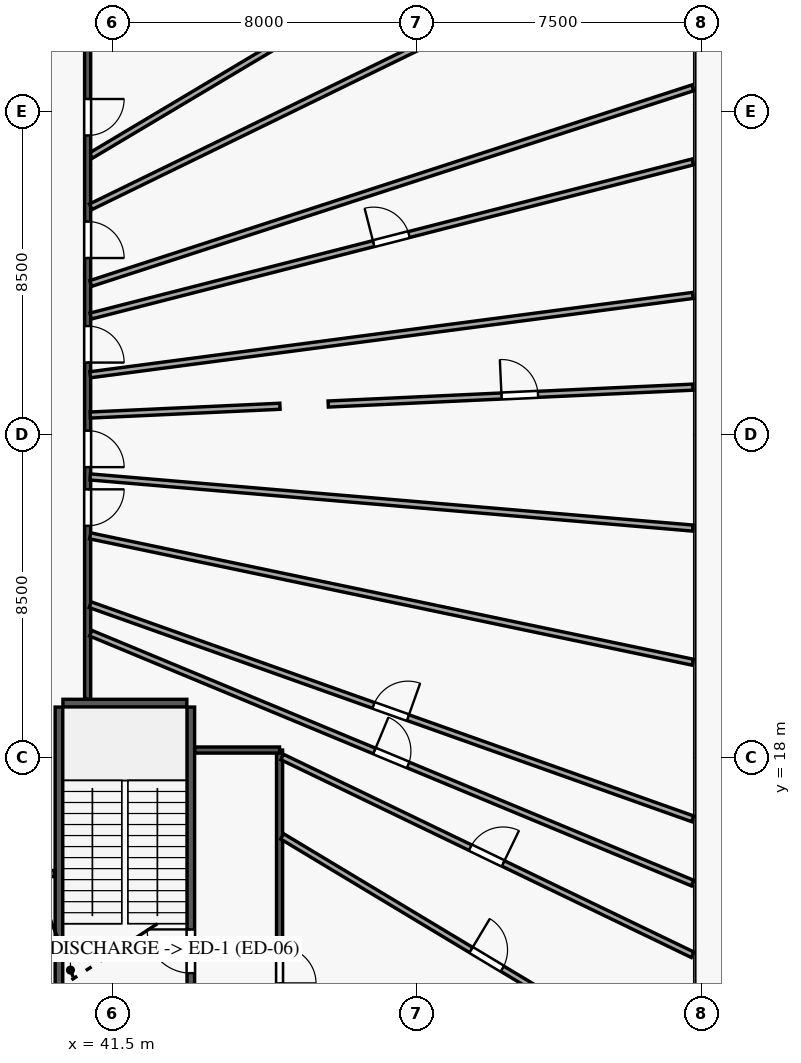
"""IFC4 building model, lengths in metres.
Left out: names, types, materials, properties, quantities, classifications, styles, units other than length and angle.
Written with IfcOpenShell. Run it as: python <this file> out.ifc"""

import sys

from ifc_helpers import new_model, si_unit, direction, frame, frame_2d, origin, origin_with_axes, origin_2d, place, context, subcontext, project, spatial, rectangle, circle, extrude, source, transform, mapped, element, fill, save


model = new_model("IFC4")
c1 = context("Model", 3, precision=1e-05, world=origin(), true_north=direction((0.0, 1.0)))
c2 = subcontext(c1, "Body", "Model", "MODEL_VIEW")
j1 = project(units=[si_unit("LENGTHUNIT", "METRE"), si_unit("PLANEANGLEUNIT", "RADIAN")], contexts=[c1])
p1 = place(None, origin())
s1 = spatial("IfcSite", under=j1, at=p1, CompositionType="ELEMENT")
p2 = place(p1, origin())
s2 = spatial("IfcBuilding", under=s1, at=p2, CompositionType="ELEMENT")
p3 = place(p2, origin())
s3 = spatial("IfcBuildingStorey", under=s2, at=p3, CompositionType="ELEMENT", Elevation=0.0)
m1 = source(origin_with_axes(), c2, "Body", "SweptSolid", [
    extrude(circle(Radius=0.9, at=origin_2d()), origin(), (0.0, 0.0, 1.0), 4.5),
])
p4 = place(p3, frame((46.8, 26.5, 0.0), z_axis=(0.0, 0.0, 1.0), x_axis=(1.0, 0.0, 0.0)))
e1 = element("IfcColumn", 1, at=p4, inside=s3, PredefinedType="COLUMN", context=c2, shape_type="MappedRepresentation", body=[
    mapped(m1, transform((0.0, 0.0, 0.0), scale=1.0)),
])
m2 = source(origin_with_axes(), c2, "Body", "SweptSolid", [
    extrude(rectangle(XDim=0.6, YDim=0.9, at=origin_2d()), origin(), (0.0, 0.0, 1.0), 4.5),
])
for number, where, z_axis, x_axis in (
    (2, (54.8, 18.5, 0.0), (0.0, 0.0, 1.0), (1.0, 0.0, 0.0)),
    (3, (54.8, 34.5, 0.0), (0.0, 0.0, 1.0), (1.0, 0.0, 0.0)),
):
    element("IfcColumn", number, at=place(p3, frame(where, z_axis=z_axis, x_axis=x_axis)), inside=s3, PredefinedType="PILASTER", context=c2, shape_type="MappedRepresentation", body=[
        mapped(m2, transform((0.0, 0.0, 0.0), scale=1.0)),
    ])
p5 = place(p3, frame((40.095, 11.98, 0.0), z_axis=(0.0, 0.0, 1.0), x_axis=(0.0, 1.0, 0.0)))
e4 = element("IfcWall", 4, at=p5, inside=s3, PredefinedType="SHEAR", context=c2, shape_type="SweptSolid", body=[
    extrude(rectangle(XDim=7.35, YDim=0.2, at=frame_2d((3.675, 0.0))), origin(), (0.0, 0.0, 1.0), 4.2),
])
p6 = place(p3, frame((43.565, 11.98, 0.0), z_axis=(0.0, 0.0, 1.0), x_axis=(0.0, 1.0, 0.0)))
e5 = element("IfcWall", 5, at=p6, inside=s3, PredefinedType="SHEAR", context=c2, shape_type="SweptSolid", body=[
    extrude(rectangle(XDim=7.35, YDim=0.2, at=frame_2d((3.675, 0.0))), origin(), (0.0, 0.0, 1.0), 4.2),
])
p7 = place(p6, frame((0.35, 0.0, 0.0)))
e6 = element("IfcOpeningElement", 6, at=p7, cuts=e5, PredefinedType="OPENING", context=c2, shape_type="SweptSolid", body=[
    extrude(rectangle(XDim=1.15, YDim=2.15, at=frame_2d((0.575, 1.075))), frame((0.0, 0.11, 0.0), z_axis=(0.0, -1.0, 0.0), x_axis=(1.0, 0.0, 0.0)), (0.0, 0.0, 1.0), 0.22),
])
p8 = place(p3, frame((40.2, 19.435, 0.0), z_axis=(0.0, 0.0, 1.0), x_axis=(1.0, 0.0, 0.0)))
e7 = element("IfcWall", 7, at=p8, inside=s3, PredefinedType="SHEAR", context=c2, shape_type="SweptSolid", body=[
    extrude(rectangle(XDim=3.26, YDim=0.2, at=frame_2d((1.63, 0.0))), origin(), (0.0, 0.0, 1.0), 4.2),
])
p9 = place(p3, frame((40.932, 33.839, 0.0), z_axis=(0.0, 0.0, 1.0), x_axis=(0.859023594577, 0.51193599596, 0.0)))
e8 = element("IfcWall", 8, at=p9, inside=s3, PredefinedType="PARTITIONING", context=c2, shape_type="SweptSolid", body=[
    extrude(rectangle(XDim=18.433, YDim=0.16, at=frame_2d((9.216, 0.0))), origin(), (0.0, 0.0, 1.0), 4.2),
])
p10 = place(p9, frame((8.724, 0.0, 0.0)))
e9 = element("IfcOpeningElement", 9, at=p10, cuts=e8, PredefinedType="OPENING", context=c2, shape_type="SweptSolid", body=[
    extrude(rectangle(XDim=0.96, YDim=2.15, at=frame_2d((0.48, 1.075))), frame((0.0, 0.09, 0.0), z_axis=(0.0, -1.0, 0.0), x_axis=(1.0, 0.0, 0.0)), (0.0, 0.0, 1.0), 0.18),
])
p11 = place(p3, frame((40.85, 38.05, 0.0), z_axis=(0.0, 0.0, 1.0), x_axis=(0.0, -1.0, 0.0)))
e10 = element("IfcWall", 10, at=p11, inside=s3, PredefinedType="PARTITIONING", context=c2, shape_type="SweptSolid", body=[
    extrude(rectangle(XDim=18.508, YDim=0.16, at=frame_2d((9.254, 0.0))), origin(), (0.0, 0.0, 1.0), 3.25),
])
p12 = place(p11, frame((12.99, 0.0, 0.0)))
e11 = element("IfcOpeningElement", 11, at=p12, cuts=e10, PredefinedType="OPENING", context=c2, shape_type="SweptSolid", body=[
    extrude(rectangle(XDim=0.96, YDim=2.15, at=frame_2d((0.48, 1.075))), frame((0.0, 0.09, 0.0), z_axis=(0.0, -1.0, 0.0), x_axis=(1.0, 0.0, 0.0)), (0.0, 0.0, 1.0), 0.18),
])
p13 = place(p11, frame((11.446, 0.0, 0.0)))
e12 = element("IfcOpeningElement", 12, at=p13, cuts=e10, PredefinedType="OPENING", context=c2, shape_type="SweptSolid", body=[
    extrude(rectangle(XDim=0.96, YDim=2.15, at=frame_2d((0.48, 1.075))), frame((0.0, 0.09, 0.0), z_axis=(0.0, -1.0, 0.0), x_axis=(1.0, 0.0, 0.0)), (0.0, 0.0, 1.0), 0.18),
])
p14 = place(p11, frame((8.695, 0.0, 0.0)))
e13 = element("IfcOpeningElement", 13, at=p14, cuts=e10, PredefinedType="OPENING", context=c2, shape_type="SweptSolid", body=[
    extrude(rectangle(XDim=0.96, YDim=2.15, at=frame_2d((0.48, 1.075))), frame((0.0, 0.09, 0.0), z_axis=(0.0, -1.0, 0.0), x_axis=(1.0, 0.0, 0.0)), (0.0, 0.0, 1.0), 0.18),
])
p15 = place(p11, frame((5.944, 0.0, 0.0)))
e14 = element("IfcOpeningElement", 14, at=p15, cuts=e10, PredefinedType="OPENING", context=c2, shape_type="SweptSolid", body=[
    extrude(rectangle(XDim=0.96, YDim=2.15, at=frame_2d((0.48, 1.075))), frame((0.0, 0.09, 0.0), z_axis=(0.0, -1.0, 0.0), x_axis=(1.0, 0.0, 0.0)), (0.0, 0.0, 1.0), 0.18),
])
p16 = place(p11, frame((2.72, 0.0, 0.0)))
e15 = element("IfcOpeningElement", 15, at=p16, cuts=e10, PredefinedType="OPENING", context=c2, shape_type="SweptSolid", body=[
    extrude(rectangle(XDim=0.96, YDim=2.15, at=frame_2d((0.48, 1.075))), frame((0.0, 0.09, 0.0), z_axis=(0.0, -1.0, 0.0), x_axis=(1.0, 0.0, 0.0)), (0.0, 0.0, 1.0), 0.18),
])
p17 = place(p3, frame((40.932, 32.495, 0.0), z_axis=(0.0, 0.0, 1.0), x_axis=(0.898852728793, 0.438250809403, 0.0)))
e16 = element("IfcWall", 16, at=p17, inside=s3, PredefinedType="PARTITIONING", context=c2, shape_type="SweptSolid", body=[
    extrude(rectangle(XDim=17.619, YDim=0.16, at=frame_2d((8.809, 0.0))), origin(), (0.0, 0.0, 1.0), 4.2),
])
p18 = place(p3, frame((40.932, 21.274, 0.0), z_axis=(0.0, 0.0, 1.0), x_axis=(0.923573591062, -0.383421206889, 0.0)))
e17 = element("IfcWall", 17, at=p18, inside=s3, PredefinedType="PARTITIONING", context=c2, shape_type="SweptSolid", body=[
    extrude(rectangle(XDim=17.149, YDim=0.16, at=frame_2d((8.574, 0.0))), origin(), (0.0, 0.0, 1.0), 4.2),
])
p19 = place(p18, frame((8.082, 0.0, 0.0)))
e18 = element("IfcOpeningElement", 18, at=p19, cuts=e17, PredefinedType="OPENING", context=c2, shape_type="SweptSolid", body=[
    extrude(rectangle(XDim=0.96, YDim=2.15, at=frame_2d((0.48, 1.075))), frame((0.0, 0.09, 0.0), z_axis=(0.0, -1.0, 0.0), x_axis=(1.0, 0.0, 0.0)), (0.0, 0.0, 1.0), 0.18),
])
p20 = place(p3, frame((40.918, 22.024, 0.0), z_axis=(0.0, 0.0, 1.0), x_axis=(0.942274220907, -0.334842190613, 0.0)))
e19 = element("IfcWall", 19, at=p20, inside=s3, PredefinedType="PARTITIONING", context=c2, shape_type="SweptSolid", body=[
    extrude(rectangle(XDim=16.824, YDim=0.16, at=frame_2d((8.412, 0.0))), origin(), (0.0, 0.0, 1.0), 4.2),
])
p21 = place(p20, frame((7.912, 0.0, 0.0)))
e20 = element("IfcOpeningElement", 20, at=p21, cuts=e19, PredefinedType="OPENING", context=c2, shape_type="SweptSolid", body=[
    extrude(rectangle(XDim=0.96, YDim=2.15, at=frame_2d((0.48, 1.075))), frame((0.0, 0.09, 0.0), z_axis=(0.0, -1.0, 0.0), x_axis=(1.0, 0.0, 0.0)), (0.0, 0.0, 1.0), 0.18),
])
p22 = place(p3, frame((40.932, 30.476, 0.0), z_axis=(0.0, 0.0, 1.0), x_axis=(0.951055611127, 0.309019780181, 0.0)))
e21 = element("IfcWall", 21, at=p22, inside=s3, PredefinedType="PARTITIONING", context=c2, shape_type="SweptSolid", body=[
    extrude(rectangle(XDim=16.655, YDim=0.16, at=frame_2d((8.328, 0.0))), origin(), (0.0, 0.0, 1.0), 3.7),
])
p23 = place(p3, frame((40.932, 29.62, 0.0), z_axis=(0.0, 0.0, 1.0), x_axis=(0.968775770521, 0.247938513451, 0.0)))
e22 = element("IfcWall", 22, at=p23, inside=s3, PredefinedType="PARTITIONING", context=c2, shape_type="SweptSolid", body=[
    extrude(rectangle(XDim=16.352, YDim=0.16, at=frame_2d((8.176, 0.0))), origin(), (0.0, 0.0, 1.0), 3.7),
])
p24 = place(p23, frame((7.683, 0.0, 0.0)))
e23 = element("IfcOpeningElement", 23, at=p24, cuts=e22, PredefinedType="OPENING", context=c2, shape_type="SweptSolid", body=[
    extrude(rectangle(XDim=0.96, YDim=2.15, at=frame_2d((0.48, 1.075))), frame((0.0, 0.09, 0.0), z_axis=(0.0, -1.0, 0.0), x_axis=(1.0, 0.0, 0.0)), (0.0, 0.0, 1.0), 0.18),
])
p25 = place(p3, frame((45.9, 18.2, 0.0), z_axis=(0.0, 0.0, 1.0), x_axis=(0.0, -1.0, 0.0)))
e24 = element("IfcWall", 24, at=p25, inside=s3, PredefinedType="PARTITIONING", context=c2, shape_type="SweptSolid", body=[
    extrude(rectangle(XDim=16.235, YDim=0.16, at=frame_2d((8.117, 0.0))), origin(), (0.0, 0.0, 1.0), 4.2),
])
p26 = place(p25, frame((11.935, 0.0, 0.0)))
e25 = element("IfcOpeningElement", 25, at=p26, cuts=e24, PredefinedType="OPENING", context=c2, shape_type="SweptSolid", body=[
    extrude(rectangle(XDim=0.96, YDim=2.15, at=frame_2d((0.48, 1.075))), frame((0.0, 0.09, 0.0), z_axis=(0.0, -1.0, 0.0), x_axis=(1.0, 0.0, 0.0)), (0.0, 0.0, 1.0), 0.18),
])
p27 = place(p25, frame((8.495, 0.0, 0.0)))
e26 = element("IfcOpeningElement", 26, at=p27, cuts=e24, PredefinedType="OPENING", context=c2, shape_type="SweptSolid", body=[
    extrude(rectangle(XDim=0.96, YDim=2.15, at=frame_2d((0.48, 1.075))), frame((0.0, 0.09, 0.0), z_axis=(0.0, -1.0, 0.0), x_axis=(1.0, 0.0, 0.0)), (0.0, 0.0, 1.0), 0.18),
])
p28 = place(p25, frame((5.181, 0.0, 0.0)))
e27 = element("IfcOpeningElement", 27, at=p28, cuts=e24, PredefinedType="OPENING", context=c2, shape_type="SweptSolid", body=[
    extrude(rectangle(XDim=0.96, YDim=2.15, at=frame_2d((0.48, 1.075))), frame((0.0, 0.09, 0.0), z_axis=(0.0, -1.0, 0.0), x_axis=(1.0, 0.0, 0.0)), (0.0, 0.0, 1.0), 0.18),
])
p29 = place(p3, frame((40.917, 23.835, 0.0), z_axis=(0.0, 0.0, 1.0), x_axis=(0.978723393047, -0.205184112209, 0.0)))
e28 = element("IfcWall", 28, at=p29, inside=s3, PredefinedType="PARTITIONING", context=c2, shape_type="SweptSolid", body=[
    extrude(rectangle(XDim=16.201, YDim=0.16, at=frame_2d((8.101, 0.0))), origin(), (0.0, 0.0, 1.0), 3.7),
])
p30 = place(p3, frame((40.917, 28.074, 0.0), z_axis=(0.0, 0.0, 1.0), x_axis=(0.991445045126, 0.130524796478, 0.0)))
e29 = element("IfcWall", 29, at=p30, inside=s3, PredefinedType="PARTITIONING", context=c2, shape_type="SweptSolid", body=[
    extrude(rectangle(XDim=15.994, YDim=0.16, at=frame_2d((7.997, 0.0))), origin(), (0.0, 0.0, 1.0), 3.7),
])
p31 = place(p3, frame((40.917, 25.386, 0.0), z_axis=(0.0, 0.0, 1.0), x_axis=(0.996417423624, -0.084571377535, 0.0)))
e30 = element("IfcWall", 30, at=p31, inside=s3, PredefinedType="PARTITIONING", context=c2, shape_type="SweptSolid", body=[
    extrude(rectangle(XDim=15.915, YDim=0.16, at=frame_2d((7.958, 0.0))), origin(), (0.0, 0.0, 1.0), 3.7),
])
p32 = place(p3, frame((34.032, 14.868, 0.0), z_axis=(0.0, 0.0, 1.0), x_axis=(0.433724291506, -0.901045636445, 0.0)))
e31 = element("IfcWall", 31, at=p32, inside=s3, PredefinedType="PARTITIONING", context=c2, shape_type="SweptSolid", body=[
    extrude(rectangle(XDim=14.468, YDim=0.16, at=frame_2d((7.234, 0.0))), origin(), (0.0, 0.0, 1.0), 4.2),
])
p33 = place(p3, frame((39.988, 14.95, 0.0), z_axis=(0.0, 0.0, 1.0), x_axis=(-1.0, 0.0, 0.0)))
e32 = element("IfcWall", 32, at=p33, inside=s3, PredefinedType="PARTITIONING", context=c2, shape_type="SweptSolid", body=[
    extrude(rectangle(XDim=14.388, YDim=0.16, at=frame_2d((7.194, 0.0))), origin(), (0.0, 0.0, 1.0), 4.2),
])
p34 = place(p33, frame((10.19, 0.0, 0.0)))
e33 = element("IfcOpeningElement", 33, at=p34, cuts=e32, PredefinedType="OPENING", context=c2, shape_type="SweptSolid", body=[
    extrude(rectangle(XDim=0.96, YDim=2.15, at=frame_2d((0.48, 1.075))), frame((0.0, 0.09, 0.0), z_axis=(0.0, -1.0, 0.0), x_axis=(1.0, 0.0, 0.0)), (0.0, 0.0, 1.0), 0.18),
])
p35 = place(p33, frame((6.878, 0.0, 0.0)))
e34 = element("IfcOpeningElement", 34, at=p35, cuts=e32, PredefinedType="OPENING", context=c2, shape_type="SweptSolid", body=[
    extrude(rectangle(XDim=0.96, YDim=2.15, at=frame_2d((0.48, 1.075))), frame((0.0, 0.09, 0.0), z_axis=(0.0, -1.0, 0.0), x_axis=(1.0, 0.0, 0.0)), (0.0, 0.0, 1.0), 0.18),
])
p36 = place(p33, frame((4.595, 0.0, 0.0)))
e35 = element("IfcOpeningElement", 35, at=p36, cuts=e32, PredefinedType="OPENING", context=c2, shape_type="SweptSolid", body=[
    extrude(rectangle(XDim=0.96, YDim=2.15, at=frame_2d((0.48, 1.075))), frame((0.0, 0.09, 0.0), z_axis=(0.0, -1.0, 0.0), x_axis=(1.0, 0.0, 0.0)), (0.0, 0.0, 1.0), 0.18),
])
p37 = place(p33, frame((2.312, 0.0, 0.0)))
e36 = element("IfcOpeningElement", 36, at=p37, cuts=e32, PredefinedType="OPENING", context=c2, shape_type="SweptSolid", body=[
    extrude(rectangle(XDim=0.96, YDim=2.15, at=frame_2d((0.48, 1.075))), frame((0.0, 0.09, 0.0), z_axis=(0.0, -1.0, 0.0), x_axis=(1.0, 0.0, 0.0)), (0.0, 0.0, 1.0), 0.18),
])
p38 = place(p3, frame((36.156, 14.881, 0.0), z_axis=(0.0, 0.0, 1.0), x_axis=(0.553761322164, -0.832675445822, 0.0)))
e37 = element("IfcWall", 37, at=p38, inside=s3, PredefinedType="PARTITIONING", context=c2, shape_type="SweptSolid", body=[
    extrude(rectangle(XDim=13.327, YDim=0.16, at=frame_2d((6.664, 0.0))), origin(), (0.0, 0.0, 1.0), 4.2),
])
p39 = place(p3, frame((45.969, 15.927, 0.0), z_axis=(0.0, 0.0, 1.0), x_axis=(0.857034319892, -0.515259327453, 0.0)))
e38 = element("IfcWall", 38, at=p39, inside=s3, PredefinedType="PARTITIONING", context=c2, shape_type="SweptSolid", body=[
    extrude(rectangle(XDim=12.598, YDim=0.16, at=frame_2d((6.299, 0.0))), origin(), (0.0, 0.0, 1.0), 4.2),
])
p40 = place(p39, frame((5.799, 0.0, 0.0)))
e39 = element("IfcOpeningElement", 39, at=p40, cuts=e38, PredefinedType="OPENING", context=c2, shape_type="SweptSolid", body=[
    extrude(rectangle(XDim=0.96, YDim=2.15, at=frame_2d((0.48, 1.075))), frame((0.0, 0.09, 0.0), z_axis=(0.0, -1.0, 0.0), x_axis=(1.0, 0.0, 0.0)), (0.0, 0.0, 1.0), 0.18),
])
p41 = place(p3, frame((45.969, 18.017, 0.0), z_axis=(0.0, 0.0, 1.0), x_axis=(0.900884595161, -0.434058689813, 0.0)))
e40 = element("IfcWall", 40, at=p41, inside=s3, PredefinedType="PARTITIONING", context=c2, shape_type="SweptSolid", body=[
    extrude(rectangle(XDim=11.988, YDim=0.16, at=frame_2d((5.994, 0.0))), origin(), (0.0, 0.0, 1.0), 4.2),
])
p42 = place(p41, frame((5.494, 0.0, 0.0)))
e41 = element("IfcOpeningElement", 41, at=p42, cuts=e40, PredefinedType="OPENING", context=c2, shape_type="SweptSolid", body=[
    extrude(rectangle(XDim=0.96, YDim=2.15, at=frame_2d((0.48, 1.075))), frame((0.0, 0.09, 0.0), z_axis=(0.0, -1.0, 0.0), x_axis=(1.0, 0.0, 0.0)), (0.0, 0.0, 1.0), 0.18),
])
p43 = place(p3, frame((47.18, 27.304, 0.0), z_axis=(0.0, 0.0, 1.0), x_axis=(0.998931741593, 0.04621012484, 0.0)))
e42 = element("IfcWall", 42, at=p43, inside=s3, PredefinedType="PARTITIONING", context=c2, shape_type="SweptSolid", body=[
    extrude(rectangle(XDim=9.605, YDim=0.16, at=frame_2d((4.802, 0.0))), origin(), (0.0, 0.0, 1.0), 3.7),
])
p44 = place(p43, frame((4.565, 0.0, 0.0)))
e43 = element("IfcOpeningElement", 43, at=p44, cuts=e42, PredefinedType="OPENING", context=c2, shape_type="SweptSolid", body=[
    extrude(rectangle(XDim=0.96, YDim=2.15, at=frame_2d((0.48, 1.075))), frame((0.0, 0.09, 0.0), z_axis=(0.0, -1.0, 0.0), x_axis=(1.0, 0.0, 0.0)), (0.0, 0.0, 1.0), 0.18),
])
p45 = place(p3, frame((40.917, 27.014, 0.0), z_axis=(0.0, 0.0, 1.0), x_axis=(0.998931863104, 0.046207498044, 0.0)))
e44 = element("IfcWall", 44, at=p45, inside=s3, PredefinedType="PARTITIONING", context=c2, shape_type="SweptSolid", body=[
    extrude(rectangle(XDim=4.998, YDim=0.16, at=frame_2d((2.499, 0.0))), origin(), (0.0, 0.0, 1.0), 3.25),
])
p46 = place(p3, frame((43.672, 18.2, 0.0), z_axis=(0.0, 0.0, 1.0), x_axis=(1.0, 0.0, 0.0)))
e45 = element("IfcWall", 45, at=p46, inside=s3, PredefinedType="PARTITIONING", context=c2, shape_type="SweptSolid", body=[
    extrude(rectangle(XDim=2.228, YDim=0.16, at=frame_2d((1.114, 0.0))), origin(), (0.0, 0.0, 1.0), 4.2),
])
m3 = source(origin_with_axes(), c2, "Body", "SweptSolid", [
    extrude(rectangle(XDim=1.15, YDim=2.15, at=frame_2d((0.575, 1.075))), frame((0.0, 0.025, 0.0), z_axis=(0.0, -1.0, 0.0), x_axis=(1.0, 0.0, 0.0)), (0.0, 0.0, 1.0), 0.05),
])
p47 = place(p7, origin())
e46 = element("IfcDoor", 46, at=p47, inside=s3, OperationType="SINGLE_SWING_RIGHT", PredefinedType="DOOR", context=c2, shape_type="MappedRepresentation", body=[
    mapped(m3, transform((0.0, 0.0, 0.0), scale=1.0)),
])
fill(e6, e46)
m4 = source(origin_with_axes(), c2, "Body", "SweptSolid", [
    extrude(rectangle(XDim=0.96, YDim=2.15, at=frame_2d((0.48, 1.075))), frame((0.0, 0.025, 0.0), z_axis=(0.0, -1.0, 0.0), x_axis=(1.0, 0.0, 0.0)), (0.0, 0.0, 1.0), 0.05),
])
p48 = place(p28, origin())
e47 = element("IfcDoor", 47, at=p48, inside=s3, OperationType="SINGLE_SWING_RIGHT", PredefinedType="DOOR", context=c2, shape_type="MappedRepresentation", body=[
    mapped(m4, transform((0.0, 0.0, 0.0), scale=1.0)),
])
fill(e27, e47)
p49 = place(p40, origin())
e48 = element("IfcDoor", 48, at=p49, inside=s3, OperationType="SINGLE_SWING_LEFT", PredefinedType="DOOR", context=c2, shape_type="MappedRepresentation", body=[
    mapped(m4, transform((0.0, 0.0, 0.0), scale=1.0)),
])
fill(e39, e48)
p50 = place(p42, origin())
e49 = element("IfcDoor", 49, at=p50, inside=s3, OperationType="SINGLE_SWING_RIGHT", PredefinedType="DOOR", context=c2, shape_type="MappedRepresentation", body=[
    mapped(m4, transform((0.0, 0.0, 0.0), scale=1.0)),
])
fill(e41, e49)
p51 = place(p19, origin())
e50 = element("IfcDoor", 50, at=p51, inside=s3, OperationType="SINGLE_SWING_LEFT", PredefinedType="DOOR", context=c2, shape_type="MappedRepresentation", body=[
    mapped(m4, transform((0.0, 0.0, 0.0), scale=1.0)),
])
fill(e18, e50)
p52 = place(p21, origin())
e51 = element("IfcDoor", 51, at=p52, inside=s3, OperationType="SINGLE_SWING_RIGHT", PredefinedType="DOOR", context=c2, shape_type="MappedRepresentation", body=[
    mapped(m4, transform((0.0, 0.0, 0.0), scale=1.0)),
])
fill(e20, e51)
p53 = place(p12, origin())
e52 = element("IfcDoor", 52, at=p53, inside=s3, OperationType="SINGLE_SWING_LEFT", PredefinedType="DOOR", context=c2, shape_type="MappedRepresentation", body=[
    mapped(m4, transform((0.0, 0.0, 0.0), scale=1.0)),
])
fill(e11, e52)
p54 = place(p13, origin())
e53 = element("IfcDoor", 53, at=p54, inside=s3, OperationType="SINGLE_SWING_RIGHT", PredefinedType="DOOR", context=c2, shape_type="MappedRepresentation", body=[
    mapped(m4, transform((0.0, 0.0, 0.0), scale=1.0)),
])
fill(e12, e53)
p55 = place(p44, origin())
e54 = element("IfcDoor", 54, at=p55, inside=s3, OperationType="SINGLE_SWING_LEFT", PredefinedType="DOOR", context=c2, shape_type="MappedRepresentation", body=[
    mapped(m4, transform((0.0, 0.0, 0.0), scale=1.0)),
])
fill(e43, e54)
p56 = place(p14, origin())
e55 = element("IfcDoor", 55, at=p56, inside=s3, OperationType="SINGLE_SWING_RIGHT", PredefinedType="DOOR", context=c2, shape_type="MappedRepresentation", body=[
    mapped(m4, transform((0.0, 0.0, 0.0), scale=1.0)),
])
fill(e13, e55)
p57 = place(p24, origin())
e56 = element("IfcDoor", 56, at=p57, inside=s3, OperationType="SINGLE_SWING_LEFT", PredefinedType="DOOR", context=c2, shape_type="MappedRepresentation", body=[
    mapped(m4, transform((0.0, 0.0, 0.0), scale=1.0)),
])
fill(e23, e56)
p58 = place(p15, origin())
e57 = element("IfcDoor", 57, at=p58, inside=s3, OperationType="SINGLE_SWING_RIGHT", PredefinedType="DOOR", context=c2, shape_type="MappedRepresentation", body=[
    mapped(m4, transform((0.0, 0.0, 0.0), scale=1.0)),
])
fill(e14, e57)
p59 = place(p16, origin())
e58 = element("IfcDoor", 58, at=p59, inside=s3, OperationType="SINGLE_SWING_LEFT", PredefinedType="DOOR", context=c2, shape_type="MappedRepresentation", body=[
    mapped(m4, transform((0.0, 0.0, 0.0), scale=1.0)),
])
fill(e15, e58)
save(model, sys.argv[1])
